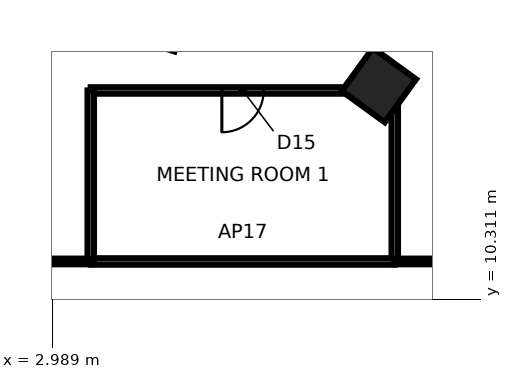
"""IFC4 building model, lengths in metres.
Left out: names, types, materials, properties, quantities, classifications, styles, units other than length and angle.
Written with IfcOpenShell. Run it as: python <this file> out.ifc"""

import sys

from ifc_helpers import new_model, si_unit, direction, frame, frame_2d, origin, origin_2d, place, context, subcontext, project, spatial, rectangle, extrude, element, fill, save


model = new_model("IFC4")
c1 = context("Model", 3, precision=1e-05, world=origin(), true_north=direction((0.0, 1.0)))
c2 = subcontext(c1, "Body", "Model", "MODEL_VIEW")
j1 = project(units=[si_unit("LENGTHUNIT", "METRE"), si_unit("PLANEANGLEUNIT", "RADIAN")], contexts=[c1])
p1 = place(None, origin())
s1 = spatial("IfcSite", under=j1, at=p1, CompositionType="ELEMENT")
p2 = place(p1, origin())
s2 = spatial("IfcBuilding", under=s1, at=p2, CompositionType="ELEMENT")
p3 = place(p2, frame((0.0, 0.0, 176.0)))
s3 = spatial("IfcBuildingStorey", under=s2, at=p3, CompositionType="ELEMENT", Elevation=176.0)
p4 = place(p3, frame((11.581, 15.94, 0.0), z_axis=(0.0, 0.0, 1.0), x_axis=(0.587785252292, 0.809016994375, 0.0)))
e1 = element("IfcColumn", 1, at=p4, inside=s3, PredefinedType="COLUMN", context=c2, shape_type="SweptSolid", body=[
    extrude(rectangle(XDim=1.4, YDim=1.4, at=origin_2d()), origin(), (0.0, 0.0, 1.0), 3.9),
])
p5 = place(p3, frame((16.0, 11.3, 0.0), z_axis=(0.0, 0.0, 1.0), x_axis=(-1.0, 0.0, 0.0)))
e2 = element("IfcWall", 2, at=p5, inside=s3, PredefinedType="PARTITIONING", context=c2, shape_type="SweptSolid", body=[
    extrude(rectangle(XDim=4.0, YDim=0.15, at=frame_2d((2.0, 0.0))), origin(), (0.0, 0.0, 1.0), 3.74),
])
p6 = place(p3, frame((12.0, 11.3, 0.0), z_axis=(0.0, 0.0, 1.0), x_axis=(0.0, 1.0, 0.0)))
e3 = element("IfcWall", 3, at=p6, inside=s3, PredefinedType="PARTITIONING", context=c2, shape_type="SweptSolid", body=[
    extrude(rectangle(XDim=4.5, YDim=0.17, at=frame_2d((2.25, 0.0))), origin(), (0.0, 0.0, 1.0), 3.74),
])
p7 = place(p3, frame((4.0, 11.3, 0.0), z_axis=(0.0, 0.0, 1.0), x_axis=(1.0, 0.0, 0.0)))
e4 = element("IfcWall", 4, at=p7, inside=s3, PredefinedType="PARTITIONING", context=c2, shape_type="SweptSolid", body=[
    extrude(rectangle(XDim=8.0, YDim=0.17, at=frame_2d((4.0, 0.0))), origin(), (0.0, 0.0, 1.0), 3.74),
])
p8 = place(p3, frame((12.0, 15.8, 0.0), z_axis=(0.0, 0.0, 1.0), x_axis=(-1.0, 0.0, 0.0)))
e5 = element("IfcWall", 5, at=p8, inside=s3, PredefinedType="PARTITIONING", context=c2, shape_type="SweptSolid", body=[
    extrude(rectangle(XDim=8.0, YDim=0.17, at=frame_2d((4.0, 0.0))), origin(), (0.0, 0.0, 1.0), 3.74),
])
p9 = place(p8, frame((3.45, 0.0, 0.0)))
e6 = element("IfcOpeningElement", 6, at=p9, cuts=e5, PredefinedType="OPENING", context=c2, shape_type="SweptSolid", body=[
    extrude(rectangle(XDim=1.1, YDim=2.4, at=frame_2d((0.55, 1.2))), frame((0.0, 0.095, 0.0), z_axis=(0.0, -1.0, 0.0), x_axis=(1.0, 0.0, 0.0)), (0.0, 0.0, 1.0), 0.19),
])
p10 = place(p3, frame((4.0, 15.8, 0.0), z_axis=(0.0, 0.0, 1.0), x_axis=(0.0, -1.0, 0.0)))
e7 = element("IfcWall", 7, at=p10, inside=s3, PredefinedType="PARTITIONING", context=c2, shape_type="SweptSolid", body=[
    extrude(rectangle(XDim=4.5, YDim=0.17, at=frame_2d((2.25, 0.0))), origin(), (0.0, 0.0, 1.0), 3.74),
])
p11 = place(p3, frame((4.0, 11.3, 0.0), z_axis=(0.0, 0.0, 1.0), x_axis=(-1.0, 0.0, 0.0)))
e8 = element("IfcWall", 8, at=p11, inside=s3, PredefinedType="PARTITIONING", context=c2, shape_type="SweptSolid", body=[
    extrude(rectangle(XDim=8.0, YDim=0.15, at=frame_2d((4.0, 0.0))), origin(), (0.0, 0.0, 1.0), 3.74),
])
p12 = place(p9, origin())
e9 = element("IfcDoor", 9, at=p12, inside=s3, OperationType="SINGLE_SWING_RIGHT", PredefinedType="DOOR", context=c2, shape_type="SweptSolid", body=[
    extrude(rectangle(XDim=1.1, YDim=2.4, at=frame_2d((0.55, 1.2))), frame((0.0, 0.025, 0.0), z_axis=(0.0, -1.0, 0.0), x_axis=(1.0, 0.0, 0.0)), (0.0, 0.0, 1.0), 0.05),
])
fill(e6, e9)
save(model, sys.argv[1])
